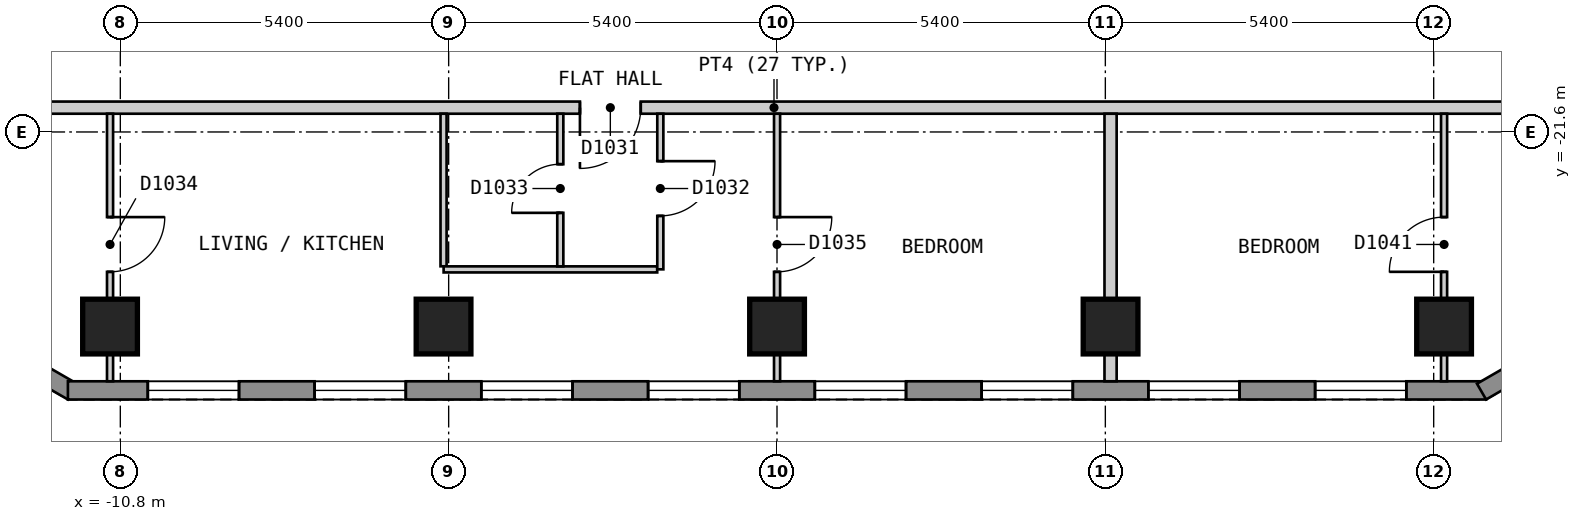
"""IFC4 building model, lengths in metres.
Left out: names, types, materials, properties, quantities, classifications, styles, units other than length and angle.
Written with IfcOpenShell. Run it as: python <this file> out.ifc"""

import sys

from ifc_helpers import new_model, si_unit, direction, frame, frame_2d, origin, origin_2d, place, context, subcontext, project, spatial, polyline, rectangle, outline, extrude, element, fill, save


model = new_model("IFC4")
c1 = context("Model", 3, precision=1e-05, world=origin(), true_north=direction((0.0, 1.0)))
c2 = subcontext(c1, "Body", "Model", "MODEL_VIEW")
j1 = project(units=[si_unit("LENGTHUNIT", "METRE"), si_unit("PLANEANGLEUNIT", "RADIAN")], contexts=[c1])
p1 = place(None, origin())
s1 = spatial("IfcSite", under=j1, at=p1, CompositionType="ELEMENT")
p2 = place(p1, origin())
s2 = spatial("IfcBuilding", under=s1, at=p2, CompositionType="ELEMENT")
p3 = place(p2, frame((0.0, 0.0, 120.6)))
s3 = spatial("IfcBuildingStorey", under=s2, at=p3, CompositionType="ELEMENT", Elevation=120.6)
for number, where, z_axis, x_axis in (
    (1, (-10.969, -24.8, 0.0), (0.0, 0.0, 1.0), (1.0, 0.0, 0.0)),
    (2, (-5.484, -24.8, 0.0), (0.0, 0.0, 1.0), (1.0, 0.0, 0.0)),
    (3, (0.001, -24.8, 0.0), (0.0, 0.0, 1.0), (1.0, 0.0, 0.0)),
    (4, (5.486, -24.8, 0.0), (0.0, 0.0, 1.0), (1.0, 0.0, 0.0)),
    (5, (10.971, -24.8, 0.0), (0.0, 0.0, 1.0), (1.0, 0.0, 0.0)),
):
    element("IfcColumn", number, at=place(p3, frame(where, z_axis=z_axis, x_axis=x_axis)), inside=s3, PredefinedType="COLUMN", context=c2, shape_type="SweptSolid", body=[
        extrude(rectangle(XDim=0.9, YDim=0.9, at=origin_2d()), origin(), (0.0, 0.0, 1.0), 3.0),
    ])
p4 = place(p3, frame((-15.917, -23.37, 0.0), z_axis=(0.0, 0.0, 1.0), x_axis=(0.866022959057, -0.500004234368, 0.0)))
e6 = element("IfcWall", 6, at=p4, inside=s3, PredefinedType="SOLIDWALL", context=c2, shape_type="SweptSolid", body=[
    extrude(outline(polyline([(0.0, -0.15), (5.0, -0.15), (4.92, 0.15), (0.08, 0.15), (0.0, -0.15)])), origin(), (0.0, 0.0, 1.0), 2.7),
])
p5 = place(p4, frame((0.65, 0.0, 0.15)))
e7 = element("IfcOpeningElement", 7, at=p5, cuts=e6, PredefinedType="OPENING", context=c2, shape_type="SweptSolid", body=[
    extrude(rectangle(XDim=1.2, YDim=2.1, at=frame_2d((0.6, 1.05))), frame((0.0, 0.16, 0.0), z_axis=(0.0, -1.0, 0.0), x_axis=(1.0, 0.0, 0.0)), (0.0, 0.0, 1.0), 0.32),
])
p6 = place(p4, frame((3.15, 0.0, 0.15)))
e8 = element("IfcOpeningElement", 8, at=p6, cuts=e6, PredefinedType="OPENING", context=c2, shape_type="SweptSolid", body=[
    extrude(rectangle(XDim=1.2, YDim=2.1, at=frame_2d((0.6, 1.05))), frame((0.0, 0.16, 0.0), z_axis=(0.0, -1.0, 0.0), x_axis=(1.0, 0.0, 0.0)), (0.0, 0.0, 1.0), 0.32),
])
p7 = place(p3, frame((-11.662, -25.85, 0.0), z_axis=(0.0, 0.0, 1.0), x_axis=(1.0, 0.0, 0.0)))
e9 = element("IfcWall", 9, at=p7, inside=s3, PredefinedType="SOLIDWALL", context=c2, shape_type="SweptSolid", body=[
    extrude(outline(polyline([(0.0, -0.15), (23.324, -0.15), (23.244, 0.15), (0.08, 0.15), (0.0, -0.15)])), origin(), (0.0, 0.0, 1.0), 2.7),
])
p8 = place(p7, frame((1.314, 0.0, 0.15)))
e10 = element("IfcOpeningElement", 10, at=p8, cuts=e9, PredefinedType="OPENING", context=c2, shape_type="SweptSolid", body=[
    extrude(rectangle(XDim=1.5, YDim=2.1, at=frame_2d((0.75, 1.05))), frame((0.0, 0.16, 0.0), z_axis=(0.0, -1.0, 0.0), x_axis=(1.0, 0.0, 0.0)), (0.0, 0.0, 1.0), 0.32),
])
p9 = place(p7, frame((4.057, 0.0, 0.15)))
e11 = element("IfcOpeningElement", 11, at=p9, cuts=e9, PredefinedType="OPENING", context=c2, shape_type="SweptSolid", body=[
    extrude(rectangle(XDim=1.5, YDim=2.1, at=frame_2d((0.75, 1.05))), frame((0.0, 0.16, 0.0), z_axis=(0.0, -1.0, 0.0), x_axis=(1.0, 0.0, 0.0)), (0.0, 0.0, 1.0), 0.32),
])
p10 = place(p7, frame((6.799, 0.0, 0.15)))
e12 = element("IfcOpeningElement", 12, at=p10, cuts=e9, PredefinedType="OPENING", context=c2, shape_type="SweptSolid", body=[
    extrude(rectangle(XDim=1.5, YDim=2.1, at=frame_2d((0.75, 1.05))), frame((0.0, 0.16, 0.0), z_axis=(0.0, -1.0, 0.0), x_axis=(1.0, 0.0, 0.0)), (0.0, 0.0, 1.0), 0.32),
])
p11 = place(p7, frame((9.542, 0.0, 0.15)))
e13 = element("IfcOpeningElement", 13, at=p11, cuts=e9, PredefinedType="OPENING", context=c2, shape_type="SweptSolid", body=[
    extrude(rectangle(XDim=1.5, YDim=2.1, at=frame_2d((0.75, 1.05))), frame((0.0, 0.16, 0.0), z_axis=(0.0, -1.0, 0.0), x_axis=(1.0, 0.0, 0.0)), (0.0, 0.0, 1.0), 0.32),
])
p12 = place(p7, frame((12.284, 0.0, 0.15)))
e14 = element("IfcOpeningElement", 14, at=p12, cuts=e9, PredefinedType="OPENING", context=c2, shape_type="SweptSolid", body=[
    extrude(rectangle(XDim=1.5, YDim=2.1, at=frame_2d((0.75, 1.05))), frame((0.0, 0.16, 0.0), z_axis=(0.0, -1.0, 0.0), x_axis=(1.0, 0.0, 0.0)), (0.0, 0.0, 1.0), 0.32),
])
p13 = place(p7, frame((15.027, 0.0, 0.15)))
e15 = element("IfcOpeningElement", 15, at=p13, cuts=e9, PredefinedType="OPENING", context=c2, shape_type="SweptSolid", body=[
    extrude(rectangle(XDim=1.5, YDim=2.1, at=frame_2d((0.75, 1.05))), frame((0.0, 0.16, 0.0), z_axis=(0.0, -1.0, 0.0), x_axis=(1.0, 0.0, 0.0)), (0.0, 0.0, 1.0), 0.32),
])
p14 = place(p7, frame((17.769, 0.0, 0.15)))
e16 = element("IfcOpeningElement", 16, at=p14, cuts=e9, PredefinedType="OPENING", context=c2, shape_type="SweptSolid", body=[
    extrude(rectangle(XDim=1.5, YDim=2.1, at=frame_2d((0.75, 1.05))), frame((0.0, 0.16, 0.0), z_axis=(0.0, -1.0, 0.0), x_axis=(1.0, 0.0, 0.0)), (0.0, 0.0, 1.0), 0.32),
])
p15 = place(p7, frame((20.512, 0.0, 0.15)))
e17 = element("IfcOpeningElement", 17, at=p15, cuts=e9, PredefinedType="OPENING", context=c2, shape_type="SweptSolid", body=[
    extrude(rectangle(XDim=1.5, YDim=2.1, at=frame_2d((0.75, 1.05))), frame((0.0, 0.16, 0.0), z_axis=(0.0, -1.0, 0.0), x_axis=(1.0, 0.0, 0.0)), (0.0, 0.0, 1.0), 0.32),
])
p16 = place(p3, frame((11.587, -25.87, 0.0), z_axis=(0.0, 0.0, 1.0), x_axis=(0.866022959057, 0.500004234368, 0.0)))
e18 = element("IfcWall", 18, at=p16, inside=s3, PredefinedType="SOLIDWALL", context=c2, shape_type="SweptSolid", body=[
    extrude(outline(polyline([(0.0, -0.15), (5.0, -0.15), (4.92, 0.15), (0.08, 0.15), (0.0, -0.15)])), origin(), (0.0, 0.0, 1.0), 2.7),
])
p17 = place(p16, frame((0.65, 0.0, 0.15)))
e19 = element("IfcOpeningElement", 19, at=p17, cuts=e18, PredefinedType="OPENING", context=c2, shape_type="SweptSolid", body=[
    extrude(rectangle(XDim=1.2, YDim=2.1, at=frame_2d((0.6, 1.05))), frame((0.0, 0.16, 0.0), z_axis=(0.0, -1.0, 0.0), x_axis=(1.0, 0.0, 0.0)), (0.0, 0.0, 1.0), 0.32),
])
p18 = place(p16, frame((3.149, 0.0, 0.15)))
e20 = element("IfcOpeningElement", 20, at=p18, cuts=e18, PredefinedType="OPENING", context=c2, shape_type="SweptSolid", body=[
    extrude(rectangle(XDim=1.2, YDim=2.1, at=frame_2d((0.6, 1.05))), frame((0.0, 0.16, 0.0), z_axis=(0.0, -1.0, 0.0), x_axis=(1.0, 0.0, 0.0)), (0.0, 0.0, 1.0), 0.32),
])
p19 = place(p3, frame((-15.499, -21.2, 0.0), z_axis=(0.0, 0.0, 1.0), x_axis=(1.0, 0.0, 0.0)))
e21 = element("IfcWall", 21, at=p19, inside=s3, PredefinedType="PARTITIONING", context=c2, shape_type="SweptSolid", body=[
    extrude(rectangle(XDim=30.899, YDim=0.2, at=frame_2d((15.449, 0.0))), origin(), (0.0, 0.0, 1.0), 2.7),
])
p20 = place(p19, frame((12.258, 0.0, 0.0)))
e22 = element("IfcOpeningElement", 22, at=p20, cuts=e21, PredefinedType="OPENING", context=c2, shape_type="SweptSolid", body=[
    extrude(rectangle(XDim=1.0, YDim=2.1, at=frame_2d((0.5, 1.05))), frame((0.0, 0.11, 0.0), z_axis=(0.0, -1.0, 0.0), x_axis=(1.0, 0.0, 0.0)), (0.0, 0.0, 1.0), 0.22),
])
p21 = place(p3, frame((-5.484, -21.3, 0.0), z_axis=(0.0, 0.0, 1.0), x_axis=(0.0, -1.0, 0.0)))
e23 = element("IfcWall", 23, at=p21, inside=s3, PredefinedType="PARTITIONING", context=c2, shape_type="SweptSolid", body=[
    extrude(rectangle(XDim=2.509, YDim=0.1, at=frame_2d((1.254, 0.0))), origin(), (0.0, 0.0, 1.0), 2.7),
])
p22 = place(p3, frame((0.001, -21.3, 0.0), z_axis=(0.0, 0.0, 1.0), x_axis=(0.0, -1.0, 0.0)))
e24 = element("IfcWall", 24, at=p22, inside=s3, PredefinedType="PARTITIONING", context=c2, shape_type="SweptSolid", body=[
    extrude(rectangle(XDim=4.4, YDim=0.1, at=frame_2d((2.2, 0.0))), origin(), (0.0, 0.0, 1.0), 2.7),
])
p23 = place(p22, frame((1.7, 0.0, 0.0)))
e25 = element("IfcOpeningElement", 25, at=p23, cuts=e24, PredefinedType="OPENING", context=c2, shape_type="SweptSolid", body=[
    extrude(rectangle(XDim=0.9, YDim=2.1, at=frame_2d((0.45, 1.05))), frame((0.0, 0.06, 0.0), z_axis=(0.0, -1.0, 0.0), x_axis=(1.0, 0.0, 0.0)), (0.0, 0.0, 1.0), 0.12),
])
p24 = place(p3, frame((-5.483, -23.86, 0.0), z_axis=(0.0, 0.0, 1.0), x_axis=(1.0, 0.0, 0.0)))
e26 = element("IfcWall", 26, at=p24, inside=s3, PredefinedType="PARTITIONING", context=c2, shape_type="SweptSolid", body=[
    extrude(rectangle(XDim=3.513, YDim=0.1, at=frame_2d((1.756, 0.0))), origin(), (0.0, 0.0, 1.0), 2.7),
])
p25 = place(p3, frame((10.971, -25.7, 0.0), z_axis=(0.0, 0.0, 1.0), x_axis=(0.0, 1.0, 0.0)))
e27 = element("IfcWall", 27, at=p25, inside=s3, PredefinedType="PARTITIONING", context=c2, shape_type="SweptSolid", body=[
    extrude(rectangle(XDim=4.4, YDim=0.1, at=frame_2d((2.2, 0.0))), origin(), (0.0, 0.0, 1.0), 2.7),
])
p26 = place(p25, frame((1.8, 0.0, 0.0)))
e28 = element("IfcOpeningElement", 28, at=p26, cuts=e27, PredefinedType="OPENING", context=c2, shape_type="SweptSolid", body=[
    extrude(rectangle(XDim=0.9, YDim=2.1, at=frame_2d((0.45, 1.05))), frame((0.0, 0.06, 0.0), z_axis=(0.0, -1.0, 0.0), x_axis=(1.0, 0.0, 0.0)), (0.0, 0.0, 1.0), 0.12),
])
p27 = place(p3, frame((-3.564, -23.81, 0.0), z_axis=(0.0, 0.0, 1.0), x_axis=(0.0, 1.0, 0.0)))
e29 = element("IfcWall", 29, at=p27, inside=s3, PredefinedType="PARTITIONING", context=c2, shape_type="SweptSolid", body=[
    extrude(rectangle(XDim=2.51, YDim=0.1, at=frame_2d((1.255, 0.0))), origin(), (0.0, 0.0, 1.0), 2.7),
])
p28 = place(p27, frame((0.88, 0.0, 0.0)))
e30 = element("IfcOpeningElement", 30, at=p28, cuts=e29, PredefinedType="OPENING", context=c2, shape_type="SweptSolid", body=[
    extrude(rectangle(XDim=0.8, YDim=2.1, at=frame_2d((0.4, 1.05))), frame((0.0, 0.06, 0.0), z_axis=(0.0, -1.0, 0.0), x_axis=(1.0, 0.0, 0.0)), (0.0, 0.0, 1.0), 0.12),
])
p29 = place(p3, frame((-10.969, -25.7, 0.0), z_axis=(0.0, 0.0, 1.0), x_axis=(0.0, 1.0, 0.0)))
e31 = element("IfcWall", 31, at=p29, inside=s3, PredefinedType="PARTITIONING", context=c2, shape_type="SweptSolid", body=[
    extrude(rectangle(XDim=4.4, YDim=0.1, at=frame_2d((2.2, 0.0))), origin(), (0.0, 0.0, 1.0), 2.7),
])
p30 = place(p29, frame((1.8, 0.0, 0.0)))
e32 = element("IfcOpeningElement", 32, at=p30, cuts=e31, PredefinedType="OPENING", context=c2, shape_type="SweptSolid", body=[
    extrude(rectangle(XDim=0.9, YDim=2.1, at=frame_2d((0.45, 1.05))), frame((0.0, 0.06, 0.0), z_axis=(0.0, -1.0, 0.0), x_axis=(1.0, 0.0, 0.0)), (0.0, 0.0, 1.0), 0.12),
])
p31 = place(p3, frame((-1.919, -23.859, 0.0), z_axis=(0.0, 0.0, 1.0), x_axis=(0.0, 1.0, 0.0)))
e33 = element("IfcWall", 33, at=p31, inside=s3, PredefinedType="PARTITIONING", context=c2, shape_type="SweptSolid", body=[
    extrude(rectangle(XDim=2.559, YDim=0.1, at=frame_2d((1.279, 0.0))), origin(), (0.0, 0.0, 1.0), 2.7),
])
p32 = place(p31, frame((0.879, 0.0, 0.0)))
e34 = element("IfcOpeningElement", 34, at=p32, cuts=e33, PredefinedType="OPENING", context=c2, shape_type="SweptSolid", body=[
    extrude(rectangle(XDim=0.9, YDim=2.1, at=frame_2d((0.45, 1.05))), frame((0.0, 0.06, 0.0), z_axis=(0.0, -1.0, 0.0), x_axis=(1.0, 0.0, 0.0)), (0.0, 0.0, 1.0), 0.12),
])
p33 = place(p3, frame((5.486, -25.7, 0.0), z_axis=(0.0, 0.0, 1.0), x_axis=(0.0, 1.0, 0.0)))
e35 = element("IfcWall", 35, at=p33, inside=s3, PredefinedType="PARTITIONING", context=c2, shape_type="SweptSolid", body=[
    extrude(rectangle(XDim=4.4, YDim=0.2, at=frame_2d((2.2, 0.0))), origin(), (0.0, 0.0, 1.0), 2.7),
])
p34 = place(p8, origin())
e36 = element("IfcWindow", 36, at=p34, inside=s3, PartitioningType="SINGLE_PANEL", PredefinedType="WINDOW", context=c2, shape_type="SweptSolid", body=[
    extrude(rectangle(XDim=1.5, YDim=2.1, at=frame_2d((0.75, 1.05))), frame((0.0, 0.03, 0.0), z_axis=(0.0, -1.0, 0.0), x_axis=(1.0, 0.0, 0.0)), (0.0, 0.0, 1.0), 0.06),
])
fill(e10, e36)
p35 = place(p9, origin())
e37 = element("IfcWindow", 37, at=p35, inside=s3, PartitioningType="SINGLE_PANEL", PredefinedType="WINDOW", context=c2, shape_type="SweptSolid", body=[
    extrude(rectangle(XDim=1.5, YDim=2.1, at=frame_2d((0.75, 1.05))), frame((0.0, 0.03, 0.0), z_axis=(0.0, -1.0, 0.0), x_axis=(1.0, 0.0, 0.0)), (0.0, 0.0, 1.0), 0.06),
])
fill(e11, e37)
p36 = place(p10, origin())
e38 = element("IfcWindow", 38, at=p36, inside=s3, PartitioningType="SINGLE_PANEL", PredefinedType="WINDOW", context=c2, shape_type="SweptSolid", body=[
    extrude(rectangle(XDim=1.5, YDim=2.1, at=frame_2d((0.75, 1.05))), frame((0.0, 0.03, 0.0), z_axis=(0.0, -1.0, 0.0), x_axis=(1.0, 0.0, 0.0)), (0.0, 0.0, 1.0), 0.06),
])
fill(e12, e38)
p37 = place(p11, origin())
e39 = element("IfcWindow", 39, at=p37, inside=s3, PartitioningType="SINGLE_PANEL", PredefinedType="WINDOW", context=c2, shape_type="SweptSolid", body=[
    extrude(rectangle(XDim=1.5, YDim=2.1, at=frame_2d((0.75, 1.05))), frame((0.0, 0.03, 0.0), z_axis=(0.0, -1.0, 0.0), x_axis=(1.0, 0.0, 0.0)), (0.0, 0.0, 1.0), 0.06),
])
fill(e13, e39)
p38 = place(p12, origin())
e40 = element("IfcWindow", 40, at=p38, inside=s3, PartitioningType="SINGLE_PANEL", PredefinedType="WINDOW", context=c2, shape_type="SweptSolid", body=[
    extrude(rectangle(XDim=1.5, YDim=2.1, at=frame_2d((0.75, 1.05))), frame((0.0, 0.03, 0.0), z_axis=(0.0, -1.0, 0.0), x_axis=(1.0, 0.0, 0.0)), (0.0, 0.0, 1.0), 0.06),
])
fill(e14, e40)
p39 = place(p13, origin())
e41 = element("IfcWindow", 41, at=p39, inside=s3, PartitioningType="SINGLE_PANEL", PredefinedType="WINDOW", context=c2, shape_type="SweptSolid", body=[
    extrude(rectangle(XDim=1.5, YDim=2.1, at=frame_2d((0.75, 1.05))), frame((0.0, 0.03, 0.0), z_axis=(0.0, -1.0, 0.0), x_axis=(1.0, 0.0, 0.0)), (0.0, 0.0, 1.0), 0.06),
])
fill(e15, e41)
p40 = place(p14, origin())
e42 = element("IfcWindow", 42, at=p40, inside=s3, PartitioningType="SINGLE_PANEL", PredefinedType="WINDOW", context=c2, shape_type="SweptSolid", body=[
    extrude(rectangle(XDim=1.5, YDim=2.1, at=frame_2d((0.75, 1.05))), frame((0.0, 0.03, 0.0), z_axis=(0.0, -1.0, 0.0), x_axis=(1.0, 0.0, 0.0)), (0.0, 0.0, 1.0), 0.06),
])
fill(e16, e42)
p41 = place(p15, origin())
e43 = element("IfcWindow", 43, at=p41, inside=s3, PartitioningType="SINGLE_PANEL", PredefinedType="WINDOW", context=c2, shape_type="SweptSolid", body=[
    extrude(rectangle(XDim=1.5, YDim=2.1, at=frame_2d((0.75, 1.05))), frame((0.0, 0.03, 0.0), z_axis=(0.0, -1.0, 0.0), x_axis=(1.0, 0.0, 0.0)), (0.0, 0.0, 1.0), 0.06),
])
fill(e17, e43)
p42 = place(p20, origin())
e44 = element("IfcDoor", 44, at=p42, inside=s3, OperationType="SINGLE_SWING_LEFT", PredefinedType="DOOR", context=c2, shape_type="SweptSolid", body=[
    extrude(rectangle(XDim=1.0, YDim=2.1, at=frame_2d((0.5, 1.05))), frame((0.0, 0.025, 0.0), z_axis=(0.0, -1.0, 0.0), x_axis=(1.0, 0.0, 0.0)), (0.0, 0.0, 1.0), 0.05),
])
fill(e22, e44)
p43 = place(p32, origin())
e45 = element("IfcDoor", 45, at=p43, inside=s3, OperationType="SINGLE_SWING_RIGHT", PredefinedType="DOOR", context=c2, shape_type="SweptSolid", body=[
    extrude(rectangle(XDim=0.9, YDim=2.1, at=frame_2d((0.45, 1.05))), frame((0.0, 0.025, 0.0), z_axis=(0.0, -1.0, 0.0), x_axis=(1.0, 0.0, 0.0)), (0.0, 0.0, 1.0), 0.05),
])
fill(e34, e45)
p44 = place(p28, origin())
e46 = element("IfcDoor", 46, at=p44, inside=s3, OperationType="SINGLE_SWING_LEFT", PredefinedType="DOOR", context=c2, shape_type="SweptSolid", body=[
    extrude(rectangle(XDim=0.8, YDim=2.1, at=frame_2d((0.4, 1.05))), frame((0.0, 0.025, 0.0), z_axis=(0.0, -1.0, 0.0), x_axis=(1.0, 0.0, 0.0)), (0.0, 0.0, 1.0), 0.05),
])
fill(e30, e46)
p45 = place(p30, origin())
e47 = element("IfcDoor", 47, at=p45, inside=s3, OperationType="SINGLE_SWING_RIGHT", PredefinedType="DOOR", context=c2, shape_type="SweptSolid", body=[
    extrude(rectangle(XDim=0.9, YDim=2.1, at=frame_2d((0.45, 1.05))), frame((0.0, 0.025, 0.0), z_axis=(0.0, -1.0, 0.0), x_axis=(1.0, 0.0, 0.0)), (0.0, 0.0, 1.0), 0.05),
])
fill(e32, e47)
p46 = place(p23, origin())
e48 = element("IfcDoor", 48, at=p46, inside=s3, OperationType="SINGLE_SWING_LEFT", PredefinedType="DOOR", context=c2, shape_type="SweptSolid", body=[
    extrude(rectangle(XDim=0.9, YDim=2.1, at=frame_2d((0.45, 1.05))), frame((0.0, 0.025, 0.0), z_axis=(0.0, -1.0, 0.0), x_axis=(1.0, 0.0, 0.0)), (0.0, 0.0, 1.0), 0.05),
])
fill(e25, e48)
p47 = place(p26, origin())
e49 = element("IfcDoor", 49, at=p47, inside=s3, OperationType="SINGLE_SWING_LEFT", PredefinedType="DOOR", context=c2, shape_type="SweptSolid", body=[
    extrude(rectangle(XDim=0.9, YDim=2.1, at=frame_2d((0.45, 1.05))), frame((0.0, 0.025, 0.0), z_axis=(0.0, -1.0, 0.0), x_axis=(1.0, 0.0, 0.0)), (0.0, 0.0, 1.0), 0.05),
])
fill(e28, e49)
save(model, sys.argv[1])
